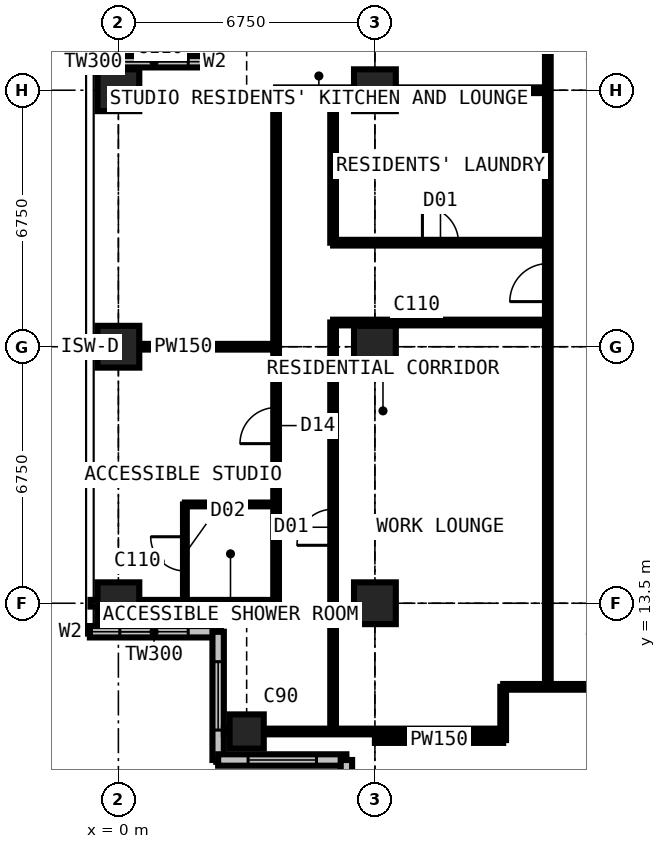
"""IFC4 building model, lengths in metres.
Left out: names, types, materials, properties, quantities, classifications, styles, units other than length and angle.
Written with IfcOpenShell. Run it as: python <this file> out.ifc"""

import sys

from ifc_helpers import new_model, si_unit, direction, frame, frame_2d, origin, origin_2d, place, context, subcontext, project, spatial, rectangle, extrude, element, fill, save


model = new_model("IFC4")
c1 = context("Model", 3, precision=1e-05, world=origin(), true_north=direction((0.0, 1.0)))
c2 = subcontext(c1, "Body", "Model", "MODEL_VIEW")
j1 = project(units=[si_unit("LENGTHUNIT", "METRE"), si_unit("PLANEANGLEUNIT", "RADIAN")], contexts=[c1])
p1 = place(None, origin())
s1 = spatial("IfcSite", under=j1, at=p1, CompositionType="ELEMENT")
p2 = place(p1, origin())
s2 = spatial("IfcBuilding", under=s1, at=p2, CompositionType="ELEMENT")
p3 = place(p2, frame((0.0, 0.0, 211.5)))
s3 = spatial("IfcBuildingStorey", under=s2, at=p3, CompositionType="ELEMENT", Elevation=211.5)
for number, where, z_axis, x_axis in (
    (1, (0.0, 13.5, 0.0), (0.0, 0.0, 1.0), (1.0, 0.0, 0.0)),
    (2, (0.0, 20.25, 0.0), (0.0, 0.0, 1.0), (1.0, 0.0, 0.0)),
    (3, (0.0, 27.0, 0.0), (0.0, 0.0, 1.0), (1.0, 0.0, 0.0)),
):
    element("IfcColumn", number, at=place(p3, frame(where, z_axis=z_axis, x_axis=x_axis)), inside=s3, PredefinedType="COLUMN", context=c2, shape_type="SweptSolid", body=[
        extrude(rectangle(XDim=1.1, YDim=1.1, at=origin_2d()), origin(), (0.0, 0.0, 1.0), 3.6),
    ])
p4 = place(p3, frame((3.375, 10.125, 0.0), z_axis=(0.0, 0.0, 1.0), x_axis=(1.0, 0.0, 0.0)))
e4 = element("IfcColumn", 4, at=p4, inside=s3, PredefinedType="COLUMN", context=c2, shape_type="SweptSolid", body=[
    extrude(rectangle(XDim=0.9, YDim=0.9, at=origin_2d()), origin(), (0.0, 0.0, 1.0), 3.6),
])
for number, where, z_axis, x_axis in (
    (5, (6.75, 13.5, 0.0), (0.0, 0.0, 1.0), (1.0, 0.0, 0.0)),
    (6, (6.75, 20.25, 0.0), (0.0, 0.0, 1.0), (1.0, 0.0, 0.0)),
    (7, (6.75, 27.0, 0.0), (0.0, 0.0, 1.0), (1.0, 0.0, 0.0)),
):
    element("IfcColumn", number, at=place(p3, frame(where, z_axis=z_axis, x_axis=x_axis)), inside=s3, PredefinedType="COLUMN", context=c2, shape_type="SweptSolid", body=[
        extrude(rectangle(XDim=1.1, YDim=1.1, at=origin_2d()), origin(), (0.0, 0.0, 1.0), 3.6),
    ])
p5 = place(p3, frame((2.625, 31.125, 0.0), z_axis=(0.0, 0.0, 1.0), x_axis=(0.0, -1.0, 0.0)))
e8 = element("IfcWall", 8, at=p5, inside=s3, PredefinedType="SOLIDWALL", context=c2, shape_type="SweptSolid", body=[
    extrude(rectangle(XDim=3.375, YDim=0.3, at=frame_2d((1.688, 0.0))), origin(), (0.0, 0.0, 1.0), 3.375),
])
p6 = place(p5, frame((0.788, 0.0, 0.6)))
e9 = element("IfcOpeningElement", 9, at=p6, cuts=e8, PredefinedType="OPENING", context=c2, shape_type="SweptSolid", body=[
    extrude(rectangle(XDim=1.8, YDim=2.1, at=frame_2d((0.9, 1.05))), frame((0.0, 0.16, 0.0), z_axis=(0.0, -1.0, 0.0), x_axis=(1.0, 0.0, 0.0)), (0.0, 0.0, 1.0), 0.32),
])
p7 = place(p3, frame((2.625, 27.75, 0.0), z_axis=(0.0, 0.0, 1.0), x_axis=(-1.0, 0.0, 0.0)))
e10 = element("IfcWall", 10, at=p7, inside=s3, PredefinedType="SOLIDWALL", context=c2, shape_type="SweptSolid", body=[
    extrude(rectangle(XDim=3.375, YDim=0.3, at=frame_2d((1.688, 0.0))), origin(), (0.0, 0.0, 1.0), 3.375),
])
p8 = place(p7, frame((0.788, 0.0, 0.6)))
e11 = element("IfcOpeningElement", 11, at=p8, cuts=e10, PredefinedType="OPENING", context=c2, shape_type="SweptSolid", body=[
    extrude(rectangle(XDim=1.8, YDim=2.1, at=frame_2d((0.9, 1.05))), frame((0.0, 0.16, 0.0), z_axis=(0.0, -1.0, 0.0), x_axis=(1.0, 0.0, 0.0)), (0.0, 0.0, 1.0), 0.32),
])
p9 = place(p3, frame((-0.75, 12.75, 0.0), z_axis=(0.0, 0.0, 1.0), x_axis=(1.0, 0.0, 0.0)))
e12 = element("IfcWall", 12, at=p9, inside=s3, PredefinedType="SOLIDWALL", context=c2, shape_type="SweptSolid", body=[
    extrude(rectangle(XDim=3.375, YDim=0.3, at=frame_2d((1.688, 0.0))), origin(), (0.0, 0.0, 1.0), 3.375),
])
p10 = place(p9, frame((0.788, 0.0, 0.6)))
e13 = element("IfcOpeningElement", 13, at=p10, cuts=e12, PredefinedType="OPENING", context=c2, shape_type="SweptSolid", body=[
    extrude(rectangle(XDim=1.8, YDim=2.1, at=frame_2d((0.9, 1.05))), frame((0.0, 0.16, 0.0), z_axis=(0.0, -1.0, 0.0), x_axis=(1.0, 0.0, 0.0)), (0.0, 0.0, 1.0), 0.32),
])
p11 = place(p3, frame((2.625, 12.75, 0.0), z_axis=(0.0, 0.0, 1.0), x_axis=(0.0, -1.0, 0.0)))
e14 = element("IfcWall", 14, at=p11, inside=s3, PredefinedType="SOLIDWALL", context=c2, shape_type="SweptSolid", body=[
    extrude(rectangle(XDim=3.375, YDim=0.3, at=frame_2d((1.688, 0.0))), origin(), (0.0, 0.0, 1.0), 3.375),
])
p12 = place(p11, frame((0.788, 0.0, 0.6)))
e15 = element("IfcOpeningElement", 15, at=p12, cuts=e14, PredefinedType="OPENING", context=c2, shape_type="SweptSolid", body=[
    extrude(rectangle(XDim=1.8, YDim=2.1, at=frame_2d((0.9, 1.05))), frame((0.0, 0.16, 0.0), z_axis=(0.0, -1.0, 0.0), x_axis=(1.0, 0.0, 0.0)), (0.0, 0.0, 1.0), 0.32),
])
p13 = place(p3, frame((2.625, 9.375, 0.0), z_axis=(0.0, 0.0, 1.0), x_axis=(1.0, 0.0, 0.0)))
e16 = element("IfcWall", 16, at=p13, inside=s3, PredefinedType="SOLIDWALL", context=c2, shape_type="SweptSolid", body=[
    extrude(rectangle(XDim=3.375, YDim=0.3, at=frame_2d((1.688, 0.0))), origin(), (0.0, 0.0, 1.0), 3.375),
])
p14 = place(p13, frame((0.788, 0.0, 0.6)))
e17 = element("IfcOpeningElement", 17, at=p14, cuts=e16, PredefinedType="OPENING", context=c2, shape_type="SweptSolid", body=[
    extrude(rectangle(XDim=1.8, YDim=2.1, at=frame_2d((0.9, 1.05))), frame((0.0, 0.16, 0.0), z_axis=(0.0, -1.0, 0.0), x_axis=(1.0, 0.0, 0.0)), (0.0, 0.0, 1.0), 0.32),
])
p15 = place(p3, frame((6.0, 9.375, 0.0), z_axis=(0.0, 0.0, 1.0), x_axis=(0.0, -1.0, 0.0)))
e18 = element("IfcWall", 18, at=p15, inside=s3, PredefinedType="SOLIDWALL", context=c2, shape_type="SweptSolid", body=[
    extrude(rectangle(XDim=3.375, YDim=0.3, at=frame_2d((1.688, 0.0))), origin(), (0.0, 0.0, 1.0), 3.375),
])
p16 = place(p15, frame((0.788, 0.0, 0.6)))
e19 = element("IfcOpeningElement", 19, at=p16, cuts=e18, PredefinedType="OPENING", context=c2, shape_type="SweptSolid", body=[
    extrude(rectangle(XDim=1.8, YDim=2.1, at=frame_2d((0.9, 1.05))), frame((0.0, 0.16, 0.0), z_axis=(0.0, -1.0, 0.0), x_axis=(1.0, 0.0, 0.0)), (0.0, 0.0, 1.0), 0.32),
])
p17 = place(p3, frame((-0.734, 13.5, 0.0), z_axis=(0.0, 0.0, 1.0), x_axis=(1.0, 0.0, 0.0)))
e20 = element("IfcWall", 20, at=p17, inside=s3, PredefinedType="PARTITIONING", context=c2, shape_type="SweptSolid", body=[
    extrude(rectangle(XDim=4.884, YDim=0.175, at=frame_2d((2.442, 0.0))), origin(), (0.0, 0.0, 1.0), 2.877),
])
p18 = place(p3, frame((-0.734, 20.25, 0.0), z_axis=(0.0, 0.0, 1.0), x_axis=(1.0, 0.0, 0.0)))
e21 = element("IfcWall", 21, at=p18, inside=s3, PredefinedType="PARTITIONING", context=c2, shape_type="SweptSolid", body=[
    extrude(rectangle(XDim=4.884, YDim=0.15, at=frame_2d((2.442, 0.0))), origin(), (0.0, 0.0, 1.0), 2.877),
])
p19 = place(p3, frame((1.75, 13.5, 0.0), z_axis=(0.0, 0.0, 1.0), x_axis=(0.0, 1.0, 0.0)))
e22 = element("IfcWall", 22, at=p19, inside=s3, PredefinedType="PARTITIONING", context=c2, shape_type="SweptSolid", body=[
    extrude(rectangle(XDim=2.6, YDim=0.1, at=frame_2d((1.3, 0.0))), origin(), (0.0, 0.0, 1.0), 3.375),
])
p20 = place(p19, frame((0.85, 0.0, 0.0)))
e23 = element("IfcOpeningElement", 23, at=p20, cuts=e22, PredefinedType="OPENING", context=c2, shape_type="SweptSolid", body=[
    extrude(rectangle(XDim=0.9, YDim=2.2, at=frame_2d((0.45, 1.1))), frame((0.0, 0.06, 0.0), z_axis=(0.0, -1.0, 0.0), x_axis=(1.0, 0.0, 0.0)), (0.0, 0.0, 1.0), 0.12),
])
p21 = place(p3, frame((1.75, 16.1, 0.0), z_axis=(0.0, 0.0, 1.0), x_axis=(1.0, 0.0, 0.0)))
e24 = element("IfcWall", 24, at=p21, inside=s3, PredefinedType="PARTITIONING", context=c2, shape_type="SweptSolid", body=[
    extrude(rectangle(XDim=2.4, YDim=0.1, at=frame_2d((1.2, 0.0))), origin(), (0.0, 0.0, 1.0), 3.375),
])
p22 = place(p3, frame((2.625, 12.766, 0.0), z_axis=(0.0, 0.0, 1.0), x_axis=(0.0, 1.0, 0.0)))
e25 = element("IfcWall", 25, at=p22, inside=s3, PredefinedType="PARTITIONING", context=c2, shape_type="SweptSolid", body=[
    extrude(rectangle(XDim=0.734, YDim=0.15, at=frame_2d((0.367, 0.0))), origin(), (0.0, 0.0, 1.0), 3.375),
])
p23 = place(p3, frame((2.775, 10.125, 0.0), z_axis=(0.0, 0.0, 1.0), x_axis=(1.0, 0.0, 0.0)))
e26 = element("IfcWall", 26, at=p23, inside=s3, PredefinedType="PARTITIONING", context=c2, shape_type="SweptSolid", body=[
    extrude(rectangle(XDim=7.35, YDim=0.15, at=frame_2d((3.675, 0.0))), origin(), (0.0, 0.0, 1.0), 2.877),
])
p24 = place(p3, frame((4.15, 13.5, 0.0), z_axis=(0.0, 0.0, 1.0), x_axis=(0.0, 1.0, 0.0)))
e27 = element("IfcWall", 27, at=p24, inside=s3, PredefinedType="PARTITIONING", context=c2, shape_type="SweptSolid", body=[
    extrude(rectangle(XDim=13.5, YDim=0.15, at=frame_2d((6.75, 0.0))), origin(), (0.0, 0.0, 1.0), 3.375),
])
p25 = place(p24, frame((4.2, 0.0, 0.0)))
e28 = element("IfcOpeningElement", 28, at=p25, cuts=e27, PredefinedType="OPENING", context=c2, shape_type="SweptSolid", body=[
    extrude(rectangle(XDim=0.95, YDim=2.2, at=frame_2d((0.475, 1.1))), frame((0.0, 0.085, 0.0), z_axis=(0.0, -1.0, 0.0), x_axis=(1.0, 0.0, 0.0)), (0.0, 0.0, 1.0), 0.17),
])
p26 = place(p3, frame((4.15, 27.0, 0.0), z_axis=(0.0, 0.0, 1.0), x_axis=(1.0, 0.0, 0.0)))
e29 = element("IfcWall", 29, at=p26, inside=s3, PredefinedType="PARTITIONING", context=c2, shape_type="SweptSolid", body=[
    extrude(rectangle(XDim=7.15, YDim=0.15, at=frame_2d((3.575, 0.0))), origin(), (0.0, 0.0, 1.0), 2.877),
])
p27 = place(p3, frame((5.65, 10.125, 0.0), z_axis=(0.0, 0.0, 1.0), x_axis=(0.0, 1.0, 0.0)))
e30 = element("IfcWall", 30, at=p27, inside=s3, PredefinedType="PARTITIONING", context=c2, shape_type="SweptSolid", body=[
    extrude(rectangle(XDim=10.762, YDim=0.15, at=frame_2d((5.381, 0.0))), origin(), (0.0, 0.0, 1.0), 3.375),
])
p28 = place(p27, frame((4.9, 0.0, 0.0)))
e31 = element("IfcOpeningElement", 31, at=p28, cuts=e30, PredefinedType="OPENING", context=c2, shape_type="SweptSolid", body=[
    extrude(rectangle(XDim=0.95, YDim=2.2, at=frame_2d((0.475, 1.1))), frame((0.0, 0.085, 0.0), z_axis=(0.0, -1.0, 0.0), x_axis=(1.0, 0.0, 0.0)), (0.0, 0.0, 1.0), 0.17),
])
p29 = place(p3, frame((5.65, 20.887, 0.0), z_axis=(0.0, 0.0, 1.0), x_axis=(1.0, 0.0, 0.0)))
e32 = element("IfcWall", 32, at=p29, inside=s3, PredefinedType="PARTITIONING", context=c2, shape_type="SweptSolid", body=[
    extrude(rectangle(XDim=5.65, YDim=0.15, at=frame_2d((2.825, 0.0))), origin(), (0.0, 0.0, 1.0), 3.375),
])
p30 = place(p3, frame((5.65, 22.988, 0.0), z_axis=(0.0, 0.0, 1.0), x_axis=(0.0, 1.0, 0.0)))
e33 = element("IfcWall", 33, at=p30, inside=s3, PredefinedType="PARTITIONING", context=c2, shape_type="SweptSolid", body=[
    extrude(rectangle(XDim=4.012, YDim=0.15, at=frame_2d((2.006, 0.0))), origin(), (0.0, 0.0, 1.0), 3.375),
])
p31 = place(p3, frame((5.65, 22.988, 0.0), z_axis=(0.0, 0.0, 1.0), x_axis=(1.0, 0.0, 0.0)))
e34 = element("IfcWall", 34, at=p31, inside=s3, PredefinedType="PARTITIONING", context=c2, shape_type="SweptSolid", body=[
    extrude(rectangle(XDim=5.65, YDim=0.15, at=frame_2d((2.825, 0.0))), origin(), (0.0, 0.0, 1.0), 3.375),
])
p32 = place(p31, frame((2.35, 0.0, 0.0)))
e35 = element("IfcOpeningElement", 35, at=p32, cuts=e34, PredefinedType="OPENING", context=c2, shape_type="SweptSolid", body=[
    extrude(rectangle(XDim=0.95, YDim=2.2, at=frame_2d((0.475, 1.1))), frame((0.0, 0.085, 0.0), z_axis=(0.0, -1.0, 0.0), x_axis=(1.0, 0.0, 0.0)), (0.0, 0.0, 1.0), 0.17),
])
p33 = place(p3, frame((6.75, 9.9, 0.0), z_axis=(0.0, 0.0, 1.0), x_axis=(1.0, 0.0, 0.0)))
e36 = element("IfcWall", 36, at=p33, inside=s3, PredefinedType="PARTITIONING", context=c2, shape_type="SweptSolid", body=[
    extrude(rectangle(XDim=3.375, YDim=0.15, at=frame_2d((1.688, 0.0))), origin(), (0.0, 0.0, 1.0), 3.375),
])
p34 = place(p3, frame((10.125, 9.9, 0.0), z_axis=(0.0, 0.0, 1.0), x_axis=(0.0, 1.0, 0.0)))
e37 = element("IfcWall", 37, at=p34, inside=s3, PredefinedType="PARTITIONING", context=c2, shape_type="SweptSolid", body=[
    extrude(rectangle(XDim=1.4, YDim=0.15, at=frame_2d((0.7, 0.0))), origin(), (0.0, 0.0, 1.0), 3.375),
])
p35 = place(p3, frame((10.125, 11.3, 0.0), z_axis=(0.0, 0.0, 1.0), x_axis=(1.0, 0.0, 0.0)))
e38 = element("IfcWall", 38, at=p35, inside=s3, PredefinedType="PARTITIONING", context=c2, shape_type="SweptSolid", body=[
    extrude(rectangle(XDim=3.375, YDim=0.15, at=frame_2d((1.688, 0.0))), origin(), (0.0, 0.0, 1.0), 3.375),
])
p36 = place(p3, frame((11.3, 11.3, 0.0), z_axis=(0.0, 0.0, 1.0), x_axis=(0.0, 1.0, 0.0)))
e39 = element("IfcWall", 39, at=p36, inside=s3, PredefinedType="PARTITIONING", context=c2, shape_type="SweptSolid", body=[
    extrude(rectangle(XDim=19.3, YDim=0.15, at=frame_2d((9.65, 0.0))), origin(), (0.0, 0.0, 1.0), 3.375),
])
p37 = place(p36, frame((18.1, 0.0, 0.0)))
e40 = element("IfcOpeningElement", 40, at=p37, cuts=e39, PredefinedType="OPENING", context=c2, shape_type="SweptSolid", body=[
    extrude(rectangle(XDim=1.0, YDim=2.2, at=frame_2d((0.5, 1.1))), frame((0.0, 0.085, 0.0), z_axis=(0.0, -1.0, 0.0), x_axis=(1.0, 0.0, 0.0)), (0.0, 0.0, 1.0), 0.17),
])
p38 = place(p36, frame((10.137, 0.0, 0.0)))
e41 = element("IfcOpeningElement", 41, at=p38, cuts=e39, PredefinedType="OPENING", context=c2, shape_type="SweptSolid", body=[
    extrude(rectangle(XDim=1.0, YDim=2.2, at=frame_2d((0.5, 1.1))), frame((0.0, 0.085, 0.0), z_axis=(0.0, -1.0, 0.0), x_axis=(1.0, 0.0, 0.0)), (0.0, 0.0, 1.0), 0.17),
])
p39 = place(p8, origin())
e42 = element("IfcWindow", 42, at=p39, inside=s3, PartitioningType="SINGLE_PANEL", PredefinedType="WINDOW", context=c2, shape_type="SweptSolid", body=[
    extrude(rectangle(XDim=1.8, YDim=2.1, at=frame_2d((0.9, 1.05))), frame((0.0, 0.03, 0.0), z_axis=(0.0, -1.0, 0.0), x_axis=(1.0, 0.0, 0.0)), (0.0, 0.0, 1.0), 0.06),
])
fill(e11, e42)
p40 = place(p10, origin())
e43 = element("IfcWindow", 43, at=p40, inside=s3, PartitioningType="SINGLE_PANEL", PredefinedType="WINDOW", context=c2, shape_type="SweptSolid", body=[
    extrude(rectangle(XDim=1.8, YDim=2.1, at=frame_2d((0.9, 1.05))), frame((0.0, 0.03, 0.0), z_axis=(0.0, -1.0, 0.0), x_axis=(1.0, 0.0, 0.0)), (0.0, 0.0, 1.0), 0.06),
])
fill(e13, e43)
p41 = place(p12, origin())
e44 = element("IfcWindow", 44, at=p41, inside=s3, PartitioningType="SINGLE_PANEL", PredefinedType="WINDOW", context=c2, shape_type="SweptSolid", body=[
    extrude(rectangle(XDim=1.8, YDim=2.1, at=frame_2d((0.9, 1.05))), frame((0.0, 0.03, 0.0), z_axis=(0.0, -1.0, 0.0), x_axis=(1.0, 0.0, 0.0)), (0.0, 0.0, 1.0), 0.06),
])
fill(e15, e44)
p42 = place(p14, origin())
e45 = element("IfcWindow", 45, at=p42, inside=s3, PartitioningType="SINGLE_PANEL", PredefinedType="WINDOW", context=c2, shape_type="SweptSolid", body=[
    extrude(rectangle(XDim=1.8, YDim=2.1, at=frame_2d((0.9, 1.05))), frame((0.0, 0.03, 0.0), z_axis=(0.0, -1.0, 0.0), x_axis=(1.0, 0.0, 0.0)), (0.0, 0.0, 1.0), 0.06),
])
fill(e17, e45)
p43 = place(p25, origin())
e46 = element("IfcDoor", 46, at=p43, inside=s3, OperationType="SINGLE_SWING_LEFT", PredefinedType="DOOR", context=c2, shape_type="SweptSolid", body=[
    extrude(rectangle(XDim=0.95, YDim=2.2, at=frame_2d((0.475, 1.1))), frame((0.0, 0.025, 0.0), z_axis=(0.0, -1.0, 0.0), x_axis=(1.0, 0.0, 0.0)), (0.0, 0.0, 1.0), 0.05),
])
fill(e28, e46)
p44 = place(p20, origin())
e47 = element("IfcDoor", 47, at=p44, inside=s3, OperationType="SINGLE_SWING_RIGHT", PredefinedType="DOOR", context=c2, shape_type="SweptSolid", body=[
    extrude(rectangle(XDim=0.9, YDim=2.2, at=frame_2d((0.45, 1.1))), frame((0.0, 0.025, 0.0), z_axis=(0.0, -1.0, 0.0), x_axis=(1.0, 0.0, 0.0)), (0.0, 0.0, 1.0), 0.05),
])
fill(e23, e47)
p45 = place(p38, origin())
e48 = element("IfcDoor", 48, at=p45, inside=s3, OperationType="SINGLE_SWING_LEFT", PredefinedType="DOOR", context=c2, shape_type="SweptSolid", body=[
    extrude(rectangle(XDim=1.0, YDim=2.2, at=frame_2d((0.5, 1.1))), frame((0.0, 0.025, 0.0), z_axis=(0.0, -1.0, 0.0), x_axis=(1.0, 0.0, 0.0)), (0.0, 0.0, 1.0), 0.05),
])
fill(e41, e48)
p46 = place(p32, origin())
e49 = element("IfcDoor", 49, at=p46, inside=s3, OperationType="SINGLE_SWING_LEFT", PredefinedType="DOOR", context=c2, shape_type="SweptSolid", body=[
    extrude(rectangle(XDim=0.95, YDim=2.2, at=frame_2d((0.475, 1.1))), frame((0.0, 0.025, 0.0), z_axis=(0.0, -1.0, 0.0), x_axis=(1.0, 0.0, 0.0)), (0.0, 0.0, 1.0), 0.05),
])
fill(e35, e49)
p47 = place(p28, origin())
e50 = element("IfcDoor", 50, at=p47, inside=s3, OperationType="SINGLE_SWING_LEFT", PredefinedType="DOOR", context=c2, shape_type="SweptSolid", body=[
    extrude(rectangle(XDim=0.95, YDim=2.2, at=frame_2d((0.475, 1.1))), frame((0.0, 0.025, 0.0), z_axis=(0.0, -1.0, 0.0), x_axis=(1.0, 0.0, 0.0)), (0.0, 0.0, 1.0), 0.05),
])
fill(e31, e50)
save(model, sys.argv[1])
